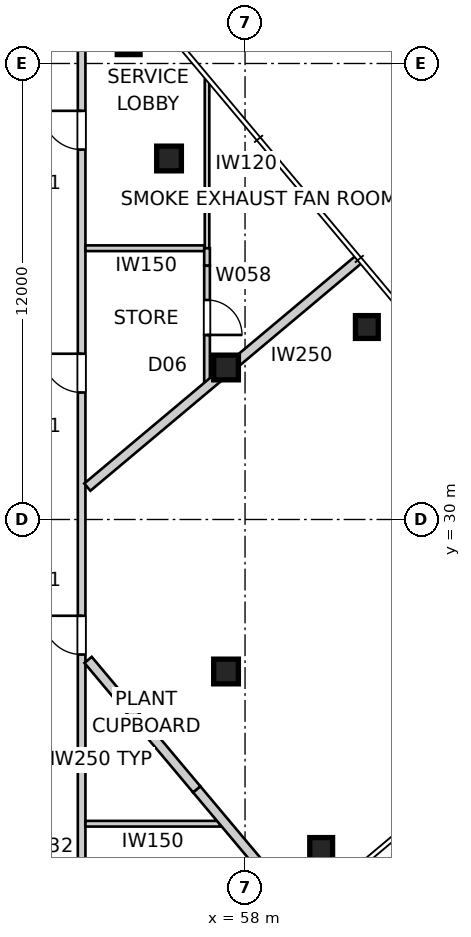
"""IFC4 building model, lengths in metres.
Left out: names, types, materials, properties, quantities, classifications, styles, units other than length and angle.
Written with IfcOpenShell. Run it as: python <this file> out.ifc"""

import sys

from ifc_helpers import new_model, si_unit, direction, frame, frame_2d, origin, origin_2d, place, context, subcontext, project, spatial, rectangle, extrude, element, fill, save


model = new_model("IFC4")
c1 = context("Model", 3, precision=1e-05, world=origin(), true_north=direction((0.0, 1.0)))
c2 = subcontext(c1, "Body", "Model", "MODEL_VIEW")
j1 = project(units=[si_unit("LENGTHUNIT", "METRE"), si_unit("PLANEANGLEUNIT", "RADIAN")], contexts=[c1])
p1 = place(None, origin())
s1 = spatial("IfcSite", under=j1, at=p1, CompositionType="ELEMENT")
p2 = place(p1, origin())
s2 = spatial("IfcBuilding", under=s1, at=p2, CompositionType="ELEMENT")
p3 = place(p2, frame((0.0, 0.0, 304.3)))
s3 = spatial("IfcBuildingStorey", under=s2, at=p3, CompositionType="ELEMENT", Elevation=304.3)
for number, where, z_axis, x_axis in (
    (1, (60.003, 21.329, 0.0), (0.0, 0.0, 1.0), (1.0, 0.0, 0.0)),
    (2, (61.205, 35.065, 0.0), (0.0, 0.0, 1.0), (1.0, 0.0, 0.0)),
    (3, (54.938, 42.534, 0.0), (0.0, 0.0, 1.0), (1.0, 0.0, 0.0)),
):
    element("IfcColumn", number, at=place(p3, frame(where, z_axis=z_axis, x_axis=x_axis)), inside=s3, PredefinedType="COLUMN", context=c2, shape_type="SweptSolid", body=[
        extrude(rectangle(XDim=0.6, YDim=0.6, at=origin_2d()), origin(), (0.0, 0.0, 1.0), 4.5),
    ])
for number, where, z_axis, x_axis in (
    (4, (57.5, 26.0, 0.0), (0.0, 0.0, 1.0), (1.0, 0.0, 0.0)),
    (5, (57.5, 34.0, 0.0), (0.0, 0.0, 1.0), (1.0, 0.0, 0.0)),
    (6, (56.0, 39.5, 0.0), (0.0, 0.0, 1.0), (1.0, 0.0, 0.0)),
):
    element("IfcColumn", number, at=place(p3, frame(where, z_axis=z_axis, x_axis=x_axis)), inside=s3, PredefinedType="COLUMN", context=c2, shape_type="SweptSolid", body=[
        extrude(rectangle(XDim=0.65, YDim=0.65, at=origin_2d()), origin(), (0.0, 0.0, 1.0), 4.5),
    ])
p4 = place(p3, frame((53.7, 16.3, 0.0), z_axis=(0.0, 0.0, 1.0), x_axis=(0.0, 1.0, 0.0)))
e7 = element("IfcWall", 7, at=p4, inside=s3, PredefinedType="PARTITIONING", context=c2, shape_type="SweptSolid", body=[
    extrude(rectangle(XDim=27.4, YDim=0.2, at=frame_2d((13.7, 0.0))), origin(), (0.0, 0.0, 1.0), 4.25),
])
p5 = place(p4, frame((10.146, 0.0, 0.0)))
e8 = element("IfcOpeningElement", 8, at=p5, cuts=e7, PredefinedType="OPENING", context=c2, shape_type="SweptSolid", body=[
    extrude(rectangle(XDim=1.02, YDim=2.34, at=frame_2d((0.51, 1.17))), frame((0.0, 0.11, 0.0), z_axis=(0.0, -1.0, 0.0), x_axis=(1.0, 0.0, 0.0)), (0.0, 0.0, 1.0), 0.22),
])
p6 = place(p4, frame((17.042, 0.0, 0.0)))
e9 = element("IfcOpeningElement", 9, at=p6, cuts=e7, PredefinedType="OPENING", context=c2, shape_type="SweptSolid", body=[
    extrude(rectangle(XDim=1.02, YDim=2.34, at=frame_2d((0.51, 1.17))), frame((0.0, 0.11, 0.0), z_axis=(0.0, -1.0, 0.0), x_axis=(1.0, 0.0, 0.0)), (0.0, 0.0, 1.0), 0.22),
])
p7 = place(p4, frame((23.434, 0.0, 0.0)))
e10 = element("IfcOpeningElement", 10, at=p7, cuts=e7, PredefinedType="OPENING", context=c2, shape_type="SweptSolid", body=[
    extrude(rectangle(XDim=1.02, YDim=2.34, at=frame_2d((0.51, 1.17))), frame((0.0, 0.11, 0.0), z_axis=(0.0, -1.0, 0.0), x_axis=(1.0, 0.0, 0.0)), (0.0, 0.0, 1.0), 0.22),
])
p8 = place(p3, frame((58.854, 20.365, 0.0), z_axis=(0.0, 0.0, 1.0), x_axis=(-0.642823301165, 0.766014492995, 0.0)))
e11 = element("IfcWall", 11, at=p8, inside=s3, PredefinedType="PARTITIONING", context=c2, shape_type="SweptSolid", body=[
    extrude(rectangle(XDim=3.308, YDim=0.25, at=frame_2d((1.654, 0.0))), origin(), (0.0, 0.0, 1.0), 3.638),
])
p9 = place(p3, frame((56.728, 22.899, 0.0), z_axis=(0.0, 0.0, 1.0), x_axis=(-0.642778620996, 0.766051985436, 0.0)))
e12 = element("IfcWall", 12, at=p9, inside=s3, PredefinedType="PARTITIONING", context=c2, shape_type="SweptSolid", body=[
    extrude(rectangle(XDim=4.446, YDim=0.25, at=frame_2d((2.223, 0.0))), origin(), (0.0, 0.0, 1.0), 4.25),
])
p10 = place(p3, frame((61.007, 36.857, 0.0), z_axis=(0.0, 0.0, 1.0), x_axis=(-0.766045019392, -0.64278692291, 0.0)))
e13 = element("IfcWall", 13, at=p10, inside=s3, PredefinedType="PARTITIONING", context=c2, shape_type="SweptSolid", body=[
    extrude(rectangle(XDim=9.343, YDim=0.25, at=frame_2d((4.671, 0.0))), origin(), (0.0, 0.0, 1.0), 4.25),
])
p11 = place(p3, frame((53.8, 21.994, 0.0), z_axis=(0.0, 0.0, 1.0), x_axis=(1.0, 0.0, 0.0)))
e14 = element("IfcWall", 14, at=p11, inside=s3, PredefinedType="SOLIDWALL", context=c2, shape_type="SweptSolid", body=[
    extrude(rectangle(XDim=3.544, YDim=0.15, at=frame_2d((1.772, 0.0))), origin(), (0.0, 0.0, 1.0), 4.25),
])
p12 = place(p3, frame((57.0, 37.138, 0.0), z_axis=(0.0, 0.0, 1.0), x_axis=(-1.0, 0.0, 0.0)))
e15 = element("IfcWall", 15, at=p12, inside=s3, PredefinedType="SOLIDWALL", context=c2, shape_type="SweptSolid", body=[
    extrude(rectangle(XDim=3.2, YDim=0.15, at=frame_2d((1.6, 0.0))), origin(), (0.0, 0.0, 1.0), 4.25),
])
p13 = place(p3, frame((57.0, 41.57, 0.0), z_axis=(0.0, 0.0, 1.0), x_axis=(0.0, -1.0, 0.0)))
e16 = element("IfcWall", 16, at=p13, inside=s3, PredefinedType="PARTITIONING", context=c2, shape_type="SweptSolid", body=[
    extrude(rectangle(XDim=4.432, YDim=0.12, at=frame_2d((2.216, 0.0))), origin(), (0.0, 0.0, 1.0), 4.25),
])
p14 = place(p3, frame((57.0, 37.138, 0.0), z_axis=(0.0, 0.0, 1.0), x_axis=(0.0, -1.0, 0.0)))
e17 = element("IfcWall", 17, at=p14, inside=s3, PredefinedType="SOLIDWALL", context=c2, shape_type="SweptSolid", body=[
    extrude(rectangle(XDim=0.46, YDim=0.15, at=frame_2d((0.23, 0.0))), origin(), (0.0, 0.0, 1.0), 4.25),
])
p15 = place(p3, frame((57.0, 36.678, 0.0), z_axis=(0.0, 0.0, 1.0), x_axis=(0.0, -1.0, 0.0)))
e18 = element("IfcWall", 18, at=p15, inside=s3, PredefinedType="SOLIDWALL", context=c2, shape_type="SweptSolid", body=[
    extrude(rectangle(XDim=1.822, YDim=0.15, at=frame_2d((0.911, 0.0))), origin(), (0.0, 0.0, 1.0), 3.25),
])
p16 = place(p15, frame((0.902, 0.0, 0.0)))
e19 = element("IfcOpeningElement", 19, at=p16, cuts=e18, PredefinedType="OPENING", context=c2, shape_type="SweptSolid", body=[
    extrude(rectangle(XDim=0.92, YDim=2.1, at=frame_2d((0.46, 1.05))), frame((0.0, 0.085, 0.0), z_axis=(0.0, -1.0, 0.0), x_axis=(1.0, 0.0, 0.0)), (0.0, 0.0, 1.0), 0.17),
])
p17 = place(p3, frame((57.0, 34.857, 0.0), z_axis=(0.0, 0.0, 1.0), x_axis=(0.0, -1.0, 0.0)))
e20 = element("IfcWall", 20, at=p17, inside=s3, PredefinedType="SOLIDWALL", context=c2, shape_type="SweptSolid", body=[
    extrude(rectangle(XDim=1.362, YDim=0.15, at=frame_2d((0.681, 0.0))), origin(), (0.0, 0.0, 1.0), 4.25),
])
p18 = place(p5, origin())
e21 = element("IfcDoor", 21, at=p18, inside=s3, OperationType="SINGLE_SWING_RIGHT", PredefinedType="DOOR", context=c2, shape_type="SweptSolid", body=[
    extrude(rectangle(XDim=1.02, YDim=2.34, at=frame_2d((0.51, 1.17))), frame((0.0, 0.025, 0.0), z_axis=(0.0, -1.0, 0.0), x_axis=(1.0, 0.0, 0.0)), (0.0, 0.0, 1.0), 0.05),
])
fill(e8, e21)
p19 = place(p6, origin())
e22 = element("IfcDoor", 22, at=p19, inside=s3, OperationType="SINGLE_SWING_RIGHT", PredefinedType="DOOR", context=c2, shape_type="SweptSolid", body=[
    extrude(rectangle(XDim=1.02, YDim=2.34, at=frame_2d((0.51, 1.17))), frame((0.0, 0.025, 0.0), z_axis=(0.0, -1.0, 0.0), x_axis=(1.0, 0.0, 0.0)), (0.0, 0.0, 1.0), 0.05),
])
fill(e9, e22)
p20 = place(p7, origin())
e23 = element("IfcDoor", 23, at=p20, inside=s3, OperationType="SINGLE_SWING_RIGHT", PredefinedType="DOOR", context=c2, shape_type="SweptSolid", body=[
    extrude(rectangle(XDim=1.02, YDim=2.34, at=frame_2d((0.51, 1.17))), frame((0.0, 0.025, 0.0), z_axis=(0.0, -1.0, 0.0), x_axis=(1.0, 0.0, 0.0)), (0.0, 0.0, 1.0), 0.05),
])
fill(e10, e23)
p21 = place(p16, origin())
e24 = element("IfcDoor", 24, at=p21, inside=s3, OperationType="SINGLE_SWING_RIGHT", PredefinedType="DOOR", context=c2, shape_type="SweptSolid", body=[
    extrude(rectangle(XDim=0.92, YDim=2.1, at=frame_2d((0.46, 1.05))), frame((0.0, 0.025, 0.0), z_axis=(0.0, -1.0, 0.0), x_axis=(1.0, 0.0, 0.0)), (0.0, 0.0, 1.0), 0.05),
])
fill(e19, e24)
save(model, sys.argv[1])
